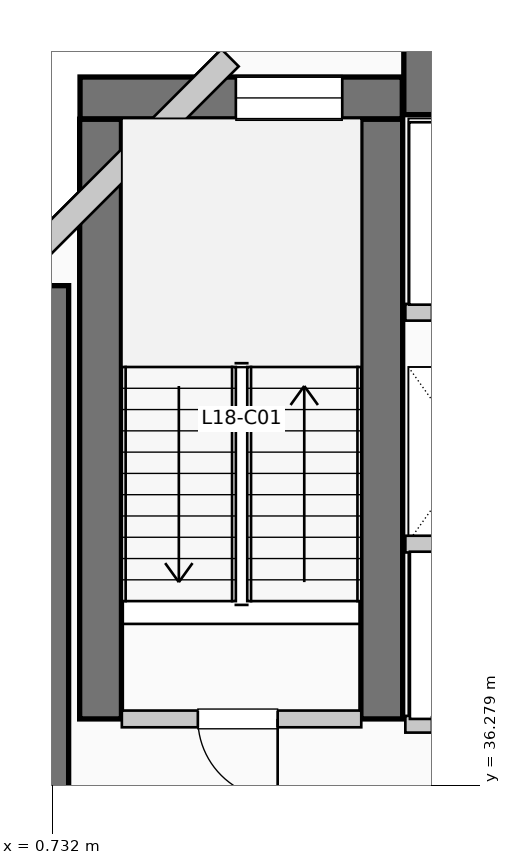
"""IFC4 building model, lengths in metres.
Left out: names, types, materials, properties, quantities, classifications, styles, units other than length and angle.
Written with IfcOpenShell. Run it as: python <this file> out.ifc"""

import sys

from ifc_helpers import new_model, si_unit, direction, frame, frame_2d, origin, place, context, subcontext, project, spatial, rectangle, extrude, element, fill, save


model = new_model("IFC4")
c1 = context("Model", 3, precision=1e-05, world=origin(), true_north=direction((0.0, 1.0)))
c2 = subcontext(c1, "Body", "Model", "MODEL_VIEW")
j1 = project(units=[si_unit("LENGTHUNIT", "METRE"), si_unit("PLANEANGLEUNIT", "RADIAN")], contexts=[c1])
p1 = place(None, origin())
s1 = spatial("IfcSite", under=j1, at=p1, CompositionType="ELEMENT")
p2 = place(p1, origin())
s2 = spatial("IfcBuilding", under=s1, at=p2, CompositionType="ELEMENT")
p3 = place(p2, frame((0.0, 0.0, 77.88)))
s3 = spatial("IfcBuildingStorey", under=s2, at=p3, CompositionType="ELEMENT", Elevation=77.88)
p4 = place(p3, frame((5.36, 45.55, 0.0), z_axis=(0.0, 0.0, 1.0), x_axis=(1.0, 0.0, 0.0)))
e1 = element("IfcWall", 1, at=p4, inside=s3, PredefinedType="SHEAR", context=c2, shape_type="SweptSolid", body=[
    extrude(rectangle(XDim=13.98, YDim=0.9, at=frame_2d((6.99, 0.0))), origin(), (0.0, 0.0, 1.0), 3.96),
])
p5 = place(p3, frame((0.5, 34.95, 0.0), z_axis=(0.0, 0.0, 1.0), x_axis=(0.0, 1.0, 0.0)))
e2 = element("IfcWall", 2, at=p5, inside=s3, PredefinedType="SHEAR", context=c2, shape_type="SweptSolid", body=[
    extrude(rectangle(XDim=7.9, YDim=0.9, at=frame_2d((3.95, 0.0))), origin(), (0.0, 0.0, 1.0), 3.96),
])
for number, where, z_axis, x_axis in (
    (3, (1.37, 37.15, 0.0), (0.0, 0.0, 1.0), (0.0, 1.0, 0.0)),
    (4, (5.07, 37.15, 0.0), (0.0, 0.0, 1.0), (0.0, 1.0, 0.0)),
):
    element("IfcWall", number, at=place(p3, frame(where, z_axis=z_axis, x_axis=x_axis)), inside=s3, PredefinedType="SHEAR", context=c2, shape_type="SweptSolid", body=[
        extrude(rectangle(XDim=7.89, YDim=0.55, at=frame_2d((3.945, 0.0))), origin(), (0.0, 0.0, 1.0), 3.96),
    ])
p6 = place(p3, frame((1.1, 45.32, 0.0), z_axis=(0.0, 0.0, 1.0), x_axis=(1.0, 0.0, 0.0)))
e5 = element("IfcWall", 5, at=p6, inside=s3, PredefinedType="SHEAR", context=c2, shape_type="SweptSolid", body=[
    extrude(rectangle(XDim=4.24, YDim=0.55, at=frame_2d((2.12, 0.0))), origin(), (0.0, 0.0, 1.0), 3.96),
])
p7 = place(p6, frame((2.05, 0.0, 1.05)))
e6 = element("IfcOpeningElement", 6, at=p7, cuts=e5, PredefinedType="OPENING", context=c2, shape_type="SweptSolid", body=[
    extrude(rectangle(XDim=1.4, YDim=1.8, at=frame_2d((0.7, 0.9))), frame((0.0, 0.285, 0.0), z_axis=(0.0, -1.0, 0.0), x_axis=(1.0, 0.0, 0.0)), (0.0, 0.0, 1.0), 0.57),
])
p8 = place(p3, frame((3.074, 45.848, 0.0), z_axis=(0.0, 0.0, 1.0), x_axis=(-0.707106781187, -0.707106781187, 0.0)))
e7 = element("IfcWall", 7, at=p8, inside=s3, PredefinedType="SOLIDWALL", context=c2, shape_type="SweptSolid", body=[
    extrude(rectangle(XDim=4.133, YDim=0.32, at=frame_2d((2.066, 0.0))), origin(), (0.0, 0.0, 1.0), 3.71),
])
p9 = place(p3, frame((1.65, 37.15, 0.0), z_axis=(0.0, 0.0, 1.0), x_axis=(1.0, 0.0, 0.0)))
e8 = element("IfcWall", 8, at=p9, inside=s3, PredefinedType="PARTITIONING", context=c2, shape_type="SweptSolid", body=[
    extrude(rectangle(XDim=3.15, YDim=0.22, at=frame_2d((1.575, 0.0))), origin(), (0.0, 0.0, 1.0), 3.71),
])
p10 = place(p9, frame((2.05, 0.0, 0.0), z_axis=(0.0, 0.0, 1.0), x_axis=(-1.0, 0.0, 0.0)))
e9 = element("IfcOpeningElement", 9, at=p10, cuts=e8, PredefinedType="OPENING", context=c2, shape_type="SweptSolid", body=[
    extrude(rectangle(XDim=1.05, YDim=2.15, at=frame_2d((0.525, 1.075))), frame((0.0, 0.12, 0.0), z_axis=(0.0, -1.0, 0.0), x_axis=(1.0, 0.0, 0.0)), (0.0, 0.0, 1.0), 0.24),
])
p11 = place(p3, frame((5.38, 37.08, 0.0), z_axis=(0.0, 0.0, 1.0), x_axis=(1.0, 0.0, 0.0)))
e10 = element("IfcWall", 10, at=p11, inside=s3, PredefinedType="PARTITIONING", context=c2, shape_type="SweptSolid", body=[
    extrude(rectangle(XDim=3.46, YDim=0.22, at=frame_2d((1.73, 0.0))), origin(), (0.0, 0.0, 1.0), 3.71),
])
p12 = place(p11, frame((1.55, 0.0, 0.0), z_axis=(0.0, 0.0, 1.0), x_axis=(-1.0, 0.0, 0.0)))
e11 = element("IfcOpeningElement", 11, at=p12, cuts=e10, PredefinedType="OPENING", context=c2, shape_type="SweptSolid", body=[
    extrude(rectangle(XDim=1.2, YDim=2.2, at=frame_2d((0.6, 1.1))), frame((0.0, 0.12, 0.0), z_axis=(0.0, -1.0, 0.0), x_axis=(1.0, 0.0, 0.0)), (0.0, 0.0, 1.0), 0.24),
])
p13 = place(p11, frame((3.22, 0.0, 0.0), z_axis=(0.0, 0.0, 1.0), x_axis=(-1.0, 0.0, 0.0)))
e12 = element("IfcOpeningElement", 12, at=p13, cuts=e10, PredefinedType="OPENING", context=c2, shape_type="SweptSolid", body=[
    extrude(rectangle(XDim=1.2, YDim=2.2, at=frame_2d((0.6, 1.1))), frame((0.0, 0.12, 0.0), z_axis=(0.0, -1.0, 0.0), x_axis=(1.0, 0.0, 0.0)), (0.0, 0.0, 1.0), 0.24),
])
p14 = place(p3, frame((5.38, 39.45, 0.0), z_axis=(0.0, 0.0, 1.0), x_axis=(1.0, 0.0, 0.0)))
e13 = element("IfcWall", 13, at=p14, inside=s3, PredefinedType="PARTITIONING", context=c2, shape_type="SweptSolid", body=[
    extrude(rectangle(XDim=3.46, YDim=0.22, at=frame_2d((1.73, 0.0))), origin(), (0.0, 0.0, 1.0), 3.71),
])
p15 = place(p3, frame((5.38, 42.5, 0.0), z_axis=(0.0, 0.0, 1.0), x_axis=(1.0, 0.0, 0.0)))
e14 = element("IfcWall", 14, at=p15, inside=s3, PredefinedType="PARTITIONING", context=c2, shape_type="SweptSolid", body=[
    extrude(rectangle(XDim=3.77, YDim=0.22, at=frame_2d((1.885, 0.0))), origin(), (0.0, 0.0, 1.0), 3.71),
])
p16 = place(p15, frame((1.75, 0.0, 0.0), z_axis=(0.0, 0.0, 1.0), x_axis=(-1.0, 0.0, 0.0)))
e15 = element("IfcOpeningElement", 15, at=p16, cuts=e14, PredefinedType="OPENING", context=c2, shape_type="SweptSolid", body=[
    extrude(rectangle(XDim=1.4, YDim=2.2, at=frame_2d((0.7, 1.1))), frame((0.0, 0.12, 0.0), z_axis=(0.0, -1.0, 0.0), x_axis=(1.0, 0.0, 0.0)), (0.0, 0.0, 1.0), 0.24),
])
p17 = place(p15, frame((3.53, 0.0, 0.0), z_axis=(0.0, 0.0, 1.0), x_axis=(-1.0, 0.0, 0.0)))
e16 = element("IfcOpeningElement", 16, at=p17, cuts=e14, PredefinedType="OPENING", context=c2, shape_type="SweptSolid", body=[
    extrude(rectangle(XDim=1.4, YDim=2.2, at=frame_2d((0.7, 1.1))), frame((0.0, 0.12, 0.0), z_axis=(0.0, -1.0, 0.0), x_axis=(1.0, 0.0, 0.0)), (0.0, 0.0, 1.0), 0.24),
])
p18 = place(p7, origin())
e17 = element("IfcWindow", 17, at=p18, inside=s3, PartitioningType="SINGLE_PANEL", PredefinedType="WINDOW", context=c2, shape_type="SweptSolid", body=[
    extrude(rectangle(XDim=1.4, YDim=1.8, at=frame_2d((0.7, 0.9))), frame((0.0, 0.03, 0.0), z_axis=(0.0, -1.0, 0.0), x_axis=(1.0, 0.0, 0.0)), (0.0, 0.0, 1.0), 0.06),
])
fill(e6, e17)
p19 = place(p10, origin())
e18 = element("IfcDoor", 18, at=p19, inside=s3, OperationType="SINGLE_SWING_RIGHT", PredefinedType="DOOR", context=c2, shape_type="SweptSolid", body=[
    extrude(rectangle(XDim=1.05, YDim=2.15, at=frame_2d((0.525, 1.075))), frame((0.0, 0.025, 0.0), z_axis=(0.0, -1.0, 0.0), x_axis=(1.0, 0.0, 0.0)), (0.0, 0.0, 1.0), 0.05),
])
fill(e9, e18)
save(model, sys.argv[1])
